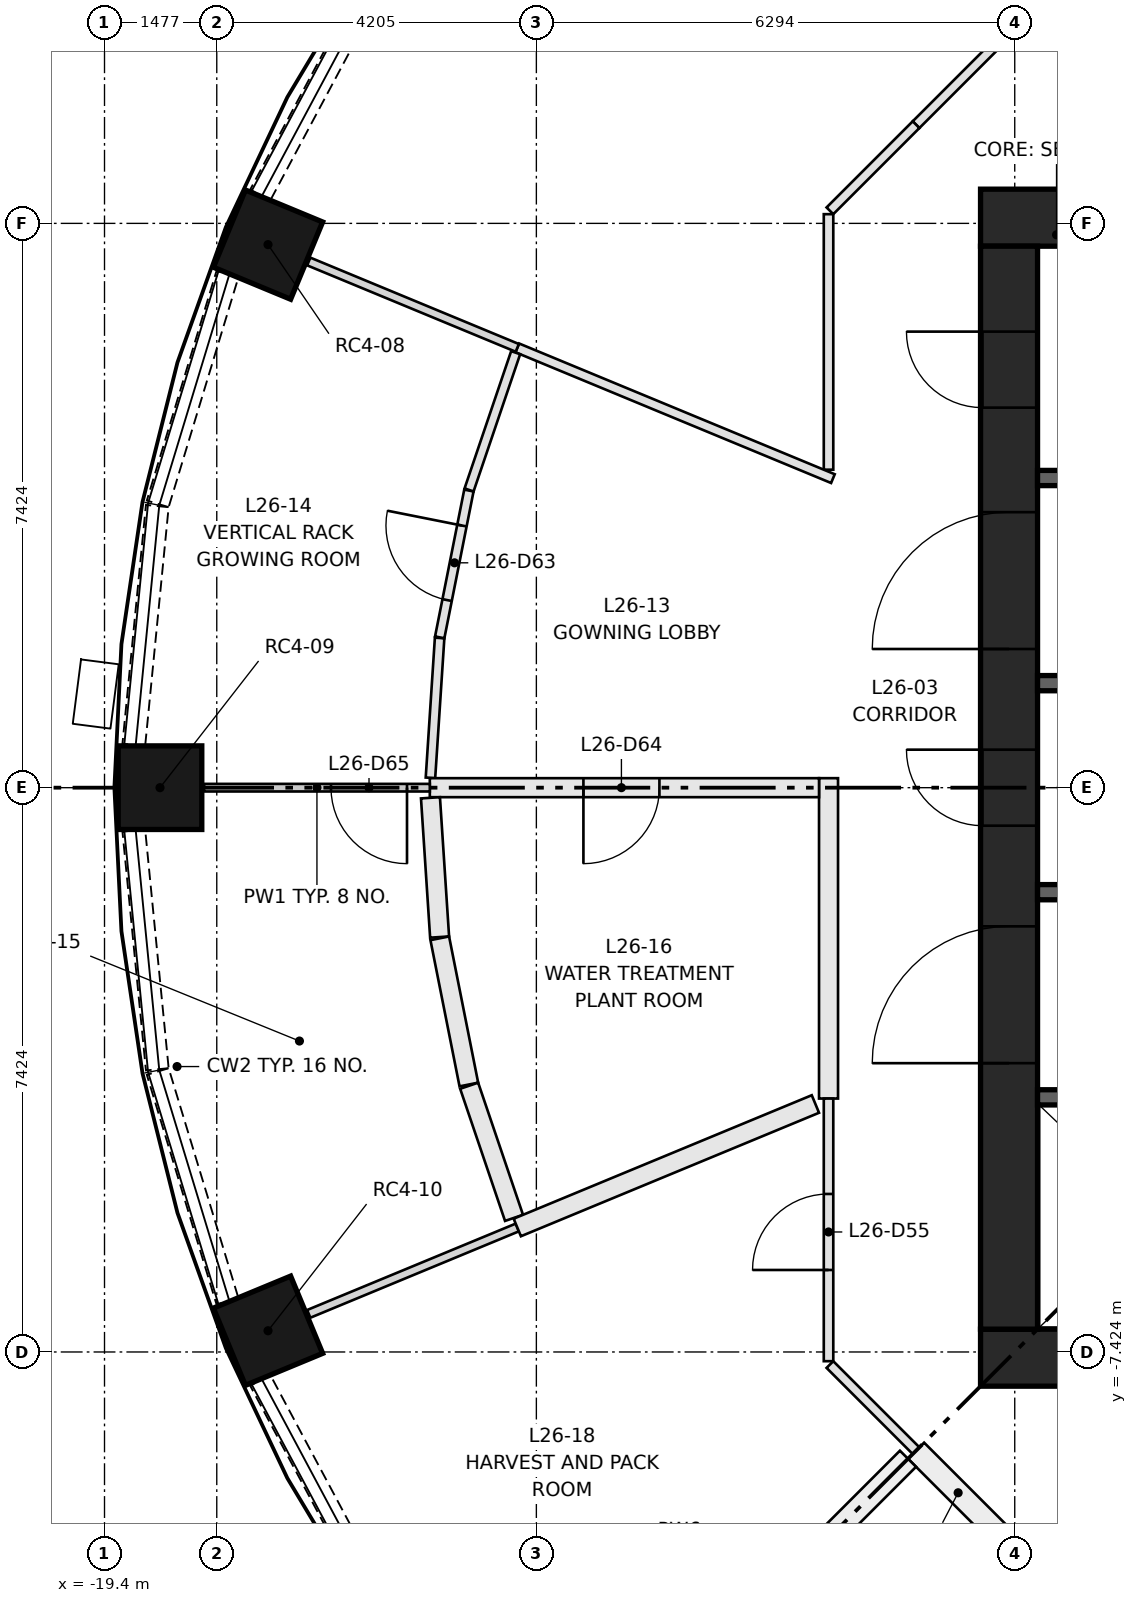
"""IFC4 building model, lengths in metres.
Left out: names, types, materials, properties, quantities, classifications, styles, units other than length and angle.
Written with IfcOpenShell. Run it as: python <this file> out.ifc"""

import sys

from ifc_helpers import new_model, si_unit, direction, frame, frame_2d, origin, origin_2d, place, context, subcontext, project, spatial, rectangle, extrude, element, fill, save


model = new_model("IFC4")
c1 = context("Model", 3, precision=1e-05, world=origin(), true_north=direction((0.0, 1.0)))
c2 = subcontext(c1, "Body", "Model", "MODEL_VIEW")
j1 = project(units=[si_unit("LENGTHUNIT", "METRE"), si_unit("PLANEANGLEUNIT", "RADIAN")], contexts=[c1])
p1 = place(None, origin())
s1 = spatial("IfcSite", under=j1, at=p1, CompositionType="ELEMENT")
p2 = place(p1, origin())
s2 = spatial("IfcBuilding", under=s1, at=p2, CompositionType="ELEMENT")
p3 = place(p2, frame((0.0, 0.0, 101.95)))
s3 = spatial("IfcBuildingStorey", under=s2, at=p3, CompositionType="ELEMENT", Elevation=101.95)
for number, where, z_axis, x_axis in (
    (1, (-17.249, 7.145, 0.0), (0.0, 0.0, 1.0), (-0.924, 0.383, 0.0)),
    (2, (-18.67, 0.0, 0.0), (0.0, 0.0, 1.0), (-1.0, 0.0, 0.0)),
    (3, (-17.249, -7.145, 0.0), (0.0, 0.0, 1.0), (-0.924, -0.383, 0.0)),
):
    element("IfcColumn", number, at=place(p3, frame(where, z_axis=z_axis, x_axis=x_axis)), inside=s3, PredefinedType="COLUMN", context=c2, shape_type="SweptSolid", body=[
        extrude(rectangle(XDim=1.1, YDim=1.1, at=origin_2d()), origin(), (0.0, 0.0, 1.0), 3.65),
    ])
for number, where, z_axis, x_axis in (
    (4, (-7.874, -7.499, 0.0), (0.0, 0.0, 1.0), (1.0, 0.0, 0.0)),
    (5, (-7.874, 7.499, 0.0), (0.0, 0.0, 1.0), (1.0, 0.0, 0.0)),
):
    element("IfcWall", number, at=place(p3, frame(where, z_axis=z_axis, x_axis=x_axis)), inside=s3, PredefinedType="SHEAR", context=c2, shape_type="SweptSolid", body=[
        extrude(rectangle(XDim=15.748, YDim=0.75, at=frame_2d((7.874, 0.0))), origin(), (0.0, 0.0, 1.0), 3.65),
    ])
p4 = place(p3, frame((-7.499, -7.124, 0.0), z_axis=(0.0, 0.0, 1.0), x_axis=(0.0, 1.0, 0.0)))
e6 = element("IfcWall", 6, at=p4, inside=s3, PredefinedType="SHEAR", context=c2, shape_type="SweptSolid", body=[
    extrude(rectangle(XDim=14.248, YDim=0.75, at=frame_2d((7.124, 0.0))), origin(), (0.0, 0.0, 1.0), 3.65),
])
p5 = place(p4, frame((6.624, 0.0, 0.0)))
e7 = element("IfcOpeningElement", 7, at=p5, cuts=e6, PredefinedType="OPENING", context=c2, shape_type="SweptSolid", body=[
    extrude(rectangle(XDim=1.0, YDim=2.1, at=frame_2d((0.5, 1.05))), frame((0.0, 0.385, 0.0), z_axis=(0.0, -1.0, 0.0), x_axis=(1.0, 0.0, 0.0)), (0.0, 0.0, 1.0), 0.77),
])
p6 = place(p4, frame((3.5, 0.0, 0.0)))
e8 = element("IfcOpeningElement", 8, at=p6, cuts=e6, PredefinedType="OPENING", context=c2, shape_type="SweptSolid", body=[
    extrude(rectangle(XDim=1.8, YDim=2.1, at=frame_2d((0.9, 1.05))), frame((0.0, 0.385, 0.0), z_axis=(0.0, -1.0, 0.0), x_axis=(1.0, 0.0, 0.0)), (0.0, 0.0, 1.0), 0.77),
])
p7 = place(p4, frame((8.948, 0.0, 0.0)))
e9 = element("IfcOpeningElement", 9, at=p7, cuts=e6, PredefinedType="OPENING", context=c2, shape_type="SweptSolid", body=[
    extrude(rectangle(XDim=1.8, YDim=2.1, at=frame_2d((0.9, 1.05))), frame((0.0, 0.385, 0.0), z_axis=(0.0, -1.0, 0.0), x_axis=(1.0, 0.0, 0.0)), (0.0, 0.0, 1.0), 0.77),
])
p8 = place(p4, frame((12.124, 0.0, 0.0)))
e10 = element("IfcOpeningElement", 10, at=p8, cuts=e6, PredefinedType="OPENING", context=c2, shape_type="SweptSolid", body=[
    extrude(rectangle(XDim=1.0, YDim=2.1, at=frame_2d((0.5, 1.05))), frame((0.0, 0.385, 0.0), z_axis=(0.0, -1.0, 0.0), x_axis=(1.0, 0.0, 0.0)), (0.0, 0.0, 1.0), 0.77),
])
p9 = place(p3, frame((-7.124, -4.074, 0.0), z_axis=(0.0, 0.0, 1.0), x_axis=(1.0, 0.0, 0.0)))
e11 = element("IfcWall", 11, at=p9, inside=s3, PredefinedType="SHEAR", context=c2, shape_type="SweptSolid", body=[
    extrude(rectangle(XDim=14.248, YDim=0.2, at=frame_2d((7.124, 0.0))), origin(), (0.0, 0.0, 1.0), 3.3),
])
p10 = place(p9, frame((1.069, 0.0, 0.0)))
e12 = element("IfcOpeningElement", 12, at=p10, cuts=e11, PredefinedType="OPENING", context=c2, shape_type="SweptSolid", body=[
    extrude(rectangle(XDim=1.1, YDim=2.1, at=frame_2d((0.55, 1.05))), frame((0.0, 0.11, 0.0), z_axis=(0.0, -1.0, 0.0), x_axis=(1.0, 0.0, 0.0)), (0.0, 0.0, 1.0), 0.22),
])
p11 = place(p9, frame((4.206, 0.0, 0.0)))
e13 = element("IfcOpeningElement", 13, at=p11, cuts=e11, PredefinedType="OPENING", context=c2, shape_type="SweptSolid", body=[
    extrude(rectangle(XDim=1.1, YDim=2.1, at=frame_2d((0.55, 1.05))), frame((0.0, 0.11, 0.0), z_axis=(0.0, -1.0, 0.0), x_axis=(1.0, 0.0, 0.0)), (0.0, 0.0, 1.0), 0.22),
])
p12 = place(p9, frame((6.808, 0.0, 0.0)))
e14 = element("IfcOpeningElement", 14, at=p12, cuts=e11, PredefinedType="OPENING", context=c2, shape_type="SweptSolid", body=[
    extrude(rectangle(XDim=1.0, YDim=2.1, at=frame_2d((0.5, 1.05))), frame((0.0, 0.11, 0.0), z_axis=(0.0, -1.0, 0.0), x_axis=(1.0, 0.0, 0.0)), (0.0, 0.0, 1.0), 0.22),
])
p13 = place(p9, frame((8.777, 0.0, 0.0)))
e15 = element("IfcOpeningElement", 15, at=p13, cuts=e11, PredefinedType="OPENING", context=c2, shape_type="SweptSolid", body=[
    extrude(rectangle(XDim=1.0, YDim=2.1, at=frame_2d((0.5, 1.05))), frame((0.0, 0.11, 0.0), z_axis=(0.0, -1.0, 0.0), x_axis=(1.0, 0.0, 0.0)), (0.0, 0.0, 1.0), 0.22),
])
p14 = place(p9, frame((10.745, 0.0, 0.0)))
e16 = element("IfcOpeningElement", 16, at=p14, cuts=e11, PredefinedType="OPENING", context=c2, shape_type="SweptSolid", body=[
    extrude(rectangle(XDim=1.0, YDim=2.1, at=frame_2d((0.5, 1.05))), frame((0.0, 0.11, 0.0), z_axis=(0.0, -1.0, 0.0), x_axis=(1.0, 0.0, 0.0)), (0.0, 0.0, 1.0), 0.22),
])
p15 = place(p9, frame((12.714, 0.0, 0.0)))
e17 = element("IfcOpeningElement", 17, at=p15, cuts=e11, PredefinedType="OPENING", context=c2, shape_type="SweptSolid", body=[
    extrude(rectangle(XDim=1.0, YDim=2.1, at=frame_2d((0.5, 1.05))), frame((0.0, 0.11, 0.0), z_axis=(0.0, -1.0, 0.0), x_axis=(1.0, 0.0, 0.0)), (0.0, 0.0, 1.0), 0.22),
])
p16 = place(p3, frame((-7.124, 4.074, 0.0), z_axis=(0.0, 0.0, 1.0), x_axis=(1.0, 0.0, 0.0)))
e18 = element("IfcWall", 18, at=p16, inside=s3, PredefinedType="SHEAR", context=c2, shape_type="SweptSolid", body=[
    extrude(rectangle(XDim=7.124, YDim=0.2, at=frame_2d((3.562, 0.0))), origin(), (0.0, 0.0, 1.0), 3.3),
])
for number, where, z_axis, x_axis in (
    (19, (-7.124, -1.375, 0.0), (0.0, 0.0, 1.0), (1.0, 0.0, 0.0)),
    (20, (-7.124, 1.375, 0.0), (0.0, 0.0, 1.0), (1.0, 0.0, 0.0)),
):
    element("IfcWall", number, at=place(p3, frame(where, z_axis=z_axis, x_axis=x_axis)), inside=s3, PredefinedType="SHEAR", context=c2, shape_type="SweptSolid", body=[
        extrude(rectangle(XDim=2.75, YDim=0.2, at=frame_2d((1.375, 0.0))), origin(), (0.0, 0.0, 1.0), 3.3),
    ])
p17 = place(p3, frame((-15.863, 10.582, 0.0), z_axis=(0.0, 0.0, 1.0), x_axis=(-0.471238306932, -0.882005928597, 0.0)))
e21 = element("IfcWall", 21, at=p17, inside=s3, PredefinedType="SOLIDWALL", context=c2, shape_type="SweptSolid", body=[
    extrude(rectangle(XDim=3.157, YDim=0.3, at=frame_2d((1.579, 0.0))), origin(), (0.0, 0.0, 1.0), 0.9),
])
p18 = place(p3, frame((-17.782, 6.756, 0.0), z_axis=(0.0, 0.0, 1.0), x_axis=(-0.290503096001, -0.956874051907, 0.0)))
e22 = element("IfcWall", 22, at=p18, inside=s3, PredefinedType="SOLIDWALL", context=c2, shape_type="SweptSolid", body=[
    extrude(rectangle(XDim=3.157, YDim=0.3, at=frame_2d((1.579, 0.0))), origin(), (0.0, 0.0, 1.0), 0.9),
])
for number, where, z_axis, x_axis in (
    (23, (-18.706, 3.705, 0.0), (0.0, 0.0, 1.0), (-0.098, -0.995, 0.0)),
    (24, (-19.014, -0.564, 0.0), (0.0, 0.0, 1.0), (0.098, -0.995, 0.0)),
):
    element("IfcWall", number, at=place(p3, frame(where, z_axis=z_axis, x_axis=x_axis)), inside=s3, PredefinedType="SOLIDWALL", context=c2, shape_type="SweptSolid", body=[
        extrude(rectangle(XDim=3.156, YDim=0.3, at=frame_2d((1.578, 0.0))), origin(), (0.0, 0.0, 1.0), 0.9),
    ])
p19 = place(p3, frame((-18.7, -3.734, 0.0), z_axis=(0.0, 0.0, 1.0), x_axis=(0.290503096001, -0.956874051907, 0.0)))
e25 = element("IfcWall", 25, at=p19, inside=s3, PredefinedType="SOLIDWALL", context=c2, shape_type="SweptSolid", body=[
    extrude(rectangle(XDim=3.157, YDim=0.3, at=frame_2d((1.579, 0.0))), origin(), (0.0, 0.0, 1.0), 0.9),
])
p20 = place(p3, frame((-17.351, -7.797, 0.0), z_axis=(0.0, 0.0, 1.0), x_axis=(0.471238306932, -0.882005928597, 0.0)))
e26 = element("IfcWall", 26, at=p20, inside=s3, PredefinedType="SOLIDWALL", context=c2, shape_type="SweptSolid", body=[
    extrude(rectangle(XDim=3.157, YDim=0.3, at=frame_2d((1.579, 0.0))), origin(), (0.0, 0.0, 1.0), 0.9),
])
p21 = place(p3, frame((-8.722, 8.722, 0.0), z_axis=(0.0, 0.0, 1.0), x_axis=(0.707030604857, 0.70718294931, 0.0)))
e27 = element("IfcWall", 27, at=p21, inside=s3, PredefinedType="PARTITIONING", context=c2, shape_type="SweptSolid", body=[
    extrude(rectangle(XDim=1.603, YDim=0.125, at=frame_2d((0.801, 0.0))), origin(), (0.0, 0.0, 1.0), 3.3),
])
p22 = place(p3, frame((-9.874, 4.183, 0.0), z_axis=(0.0, 0.0, 1.0), x_axis=(0.0, 1.0, 0.0)))
e28 = element("IfcWall", 28, at=p22, inside=s3, PredefinedType="PARTITIONING", context=c2, shape_type="SweptSolid", body=[
    extrude(rectangle(XDim=3.362, YDim=0.125, at=frame_2d((1.681, 0.0))), origin(), (0.0, 0.0, 1.0), 3.3),
])
p23 = place(p3, frame((-9.856, 7.589, 0.0), z_axis=(0.0, 0.0, 1.0), x_axis=(0.70718294931, 0.707030604857, 0.0)))
e29 = element("IfcWall", 29, at=p23, inside=s3, PredefinedType="PARTITIONING", context=c2, shape_type="SweptSolid", body=[
    extrude(rectangle(XDim=1.603, YDim=0.125, at=frame_2d((0.801, 0.0))), origin(), (0.0, 0.0, 1.0), 3.3),
])
p24 = place(p3, frame((-9.874, -4.09, 0.0), z_axis=(0.0, 0.0, 1.0), x_axis=(0.0, 1.0, 0.0)))
e30 = element("IfcWall", 30, at=p24, inside=s3, PredefinedType="PARTITIONING", context=c2, shape_type="SweptSolid", body=[
    extrude(rectangle(XDim=4.215, YDim=0.25, at=frame_2d((2.107, 0.0))), origin(), (0.0, 0.0, 1.0), 3.3),
])
p25 = place(p3, frame((-9.874, -7.545, 0.0), z_axis=(0.0, 0.0, 1.0), x_axis=(0.0, 1.0, 0.0)))
e31 = element("IfcWall", 31, at=p25, inside=s3, PredefinedType="PARTITIONING", context=c2, shape_type="SweptSolid", body=[
    extrude(rectangle(XDim=3.455, YDim=0.125, at=frame_2d((1.728, 0.0))), origin(), (0.0, 0.0, 1.0), 3.3),
])
p26 = place(p25, frame((1.2, 0.0, 0.0)))
e32 = element("IfcOpeningElement", 32, at=p26, cuts=e31, PredefinedType="OPENING", context=c2, shape_type="SweptSolid", body=[
    extrude(rectangle(XDim=1.0, YDim=2.1, at=frame_2d((0.5, 1.05))), frame((0.0, 0.073, 0.0), z_axis=(0.0, -1.0, 0.0), x_axis=(1.0, 0.0, 0.0)), (0.0, 0.0, 1.0), 0.145),
])
p27 = place(p3, frame((-8.722, -8.722, 0.0), z_axis=(0.0, 0.0, 1.0), x_axis=(-0.70718294931, 0.707030604857, 0.0)))
e33 = element("IfcWall", 33, at=p27, inside=s3, PredefinedType="PARTITIONING", context=c2, shape_type="SweptSolid", body=[
    extrude(rectangle(XDim=1.603, YDim=0.125, at=frame_2d((0.801, 0.0))), origin(), (0.0, 0.0, 1.0), 3.3),
])
p28 = place(p3, frame((-7.615, -9.83, 0.0), z_axis=(0.0, 0.0, 1.0), x_axis=(-0.707028841614, 0.70718471217, 0.0)))
e34 = element("IfcWall", 34, at=p28, inside=s3, PredefinedType="PARTITIONING", context=c2, shape_type="SweptSolid", body=[
    extrude(rectangle(XDim=1.566, YDim=0.3, at=frame_2d((0.783, 0.0))), origin(), (0.0, 0.0, 1.0), 3.3),
])
p29 = place(p3, frame((-9.816, 4.066, 0.0), z_axis=(0.0, 0.0, 1.0), x_axis=(-0.923867212496, 0.382713174158, 0.0)))
e35 = element("IfcWall", 35, at=p29, inside=s3, PredefinedType="PARTITIONING", context=c2, shape_type="SweptSolid", body=[
    extrude(rectangle(XDim=4.495, YDim=0.125, at=frame_2d((2.248, 0.0))), origin(), (0.0, 0.0, 1.0), 3.3),
])
p30 = place(p3, frame((-13.969, 5.786, 0.0), z_axis=(0.0, 0.0, 1.0), x_axis=(-0.923889594764, 0.382659139036, 0.0)))
e36 = element("IfcWall", 36, at=p30, inside=s3, PredefinedType="PARTITIONING", context=c2, shape_type="SweptSolid", body=[
    extrude(rectangle(XDim=2.97, YDim=0.11, at=frame_2d((1.485, 0.0))), origin(), (0.0, 0.0, 1.0), 3.3),
])
p31 = place(p3, frame((-15.112, 0.129, 0.0), z_axis=(0.0, 0.0, 1.0), x_axis=(0.065394347625, 0.997859498777, 0.0)))
e37 = element("IfcWall", 37, at=p31, inside=s3, PredefinedType="PARTITIONING", context=c2, shape_type="SweptSolid", body=[
    extrude(rectangle(XDim=1.844, YDim=0.125, at=frame_2d((0.922, 0.0))), origin(), (0.0, 0.0, 1.0), 3.3),
])
p32 = place(p3, frame((-14.99, 1.978, 0.0), z_axis=(0.0, 0.0, 1.0), x_axis=(0.194995562173, 0.980804124549, 0.0)))
e38 = element("IfcWall", 38, at=p32, inside=s3, PredefinedType="PARTITIONING", context=c2, shape_type="SweptSolid", body=[
    extrude(rectangle(XDim=1.969, YDim=0.125, at=frame_2d((0.985, 0.0))), origin(), (0.0, 0.0, 1.0), 3.3),
])
p33 = place(p32, frame((0.5, 0.0, 0.0)))
e39 = element("IfcOpeningElement", 39, at=p33, cuts=e38, PredefinedType="OPENING", context=c2, shape_type="SweptSolid", body=[
    extrude(rectangle(XDim=1.0, YDim=2.1, at=frame_2d((0.5, 1.05))), frame((0.0, 0.073, 0.0), z_axis=(0.0, -1.0, 0.0), x_axis=(1.0, 0.0, 0.0)), (0.0, 0.0, 1.0), 0.145),
])
p34 = place(p3, frame((-14.604, 3.917, 0.0), z_axis=(0.0, 0.0, 1.0), x_axis=(0.321484961169, 0.946914684511, 0.0)))
e40 = element("IfcWall", 40, at=p34, inside=s3, PredefinedType="PARTITIONING", context=c2, shape_type="SweptSolid", body=[
    extrude(rectangle(XDim=1.907, YDim=0.125, at=frame_2d((0.954, 0.0))), origin(), (0.0, 0.0, 1.0), 3.3),
])
p35 = place(p3, frame((-9.999, 0.0, 0.0), z_axis=(0.0, 0.0, 1.0), x_axis=(-1.0, 0.0, 0.0)))
e41 = element("IfcWall", 41, at=p35, inside=s3, PredefinedType="PARTITIONING", context=c2, shape_type="SweptSolid", body=[
    extrude(rectangle(XDim=5.121, YDim=0.25, at=frame_2d((2.561, 0.0))), origin(), (0.0, 0.0, 1.0), 3.3),
])
p36 = place(p35, frame((2.1, 0.0, 0.0)))
e42 = element("IfcOpeningElement", 42, at=p36, cuts=e41, PredefinedType="OPENING", context=c2, shape_type="SweptSolid", body=[
    extrude(rectangle(XDim=1.0, YDim=2.1, at=frame_2d((0.5, 1.05))), frame((0.0, 0.135, 0.0), z_axis=(0.0, -1.0, 0.0), x_axis=(1.0, 0.0, 0.0)), (0.0, 0.0, 1.0), 0.27),
])
p37 = place(p3, frame((-15.12, 0.0, 0.0), z_axis=(0.0, 0.0, 1.0), x_axis=(-1.0, 0.0, 0.0)))
e43 = element("IfcWall", 43, at=p37, inside=s3, PredefinedType="PARTITIONING", context=c2, shape_type="SweptSolid", body=[
    extrude(rectangle(XDim=2.97, YDim=0.1, at=frame_2d((1.485, 0.0))), origin(), (0.0, 0.0, 1.0), 3.3),
])
p38 = place(p37, frame((0.3, 0.0, 0.0)))
e44 = element("IfcOpeningElement", 44, at=p38, cuts=e43, PredefinedType="OPENING", context=c2, shape_type="SweptSolid", body=[
    extrude(rectangle(XDim=1.0, YDim=2.1, at=frame_2d((0.5, 1.05))), frame((0.0, 0.06, 0.0), z_axis=(0.0, -1.0, 0.0), x_axis=(1.0, 0.0, 0.0)), (0.0, 0.0, 1.0), 0.12),
])
p39 = place(p3, frame((-15.111, -0.133, 0.0), z_axis=(0.0, 0.0, 1.0), x_axis=(0.065424560105, -0.997857518354, 0.0)))
e45 = element("IfcWall", 45, at=p39, inside=s3, PredefinedType="PARTITIONING", context=c2, shape_type="SweptSolid", body=[
    extrude(rectangle(XDim=1.836, YDim=0.25, at=frame_2d((0.918, 0.0))), origin(), (0.0, 0.0, 1.0), 3.3),
])
p40 = place(p3, frame((-14.989, -1.982, 0.0), z_axis=(0.0, 0.0, 1.0), x_axis=(0.195062715887, -0.9807907712, 0.0)))
e46 = element("IfcWall", 46, at=p40, inside=s3, PredefinedType="PARTITIONING", context=c2, shape_type="SweptSolid", body=[
    extrude(rectangle(XDim=1.961, YDim=0.25, at=frame_2d((0.98, 0.0))), origin(), (0.0, 0.0, 1.0), 3.3),
])
p41 = place(p3, frame((-14.602, -3.921, 0.0), z_axis=(0.0, 0.0, 1.0), x_axis=(0.321528438759, -0.946899922415, 0.0)))
e47 = element("IfcWall", 47, at=p41, inside=s3, PredefinedType="PARTITIONING", context=c2, shape_type="SweptSolid", body=[
    extrude(rectangle(XDim=1.836, YDim=0.25, at=frame_2d((0.918, 0.0))), origin(), (0.0, 0.0, 1.0), 3.3),
])
p42 = place(p3, frame((-13.969, -5.786, 0.0), z_axis=(0.0, 0.0, 1.0), x_axis=(-0.923889594764, -0.382659139036, 0.0)))
e48 = element("IfcWall", 48, at=p42, inside=s3, PredefinedType="PARTITIONING", context=c2, shape_type="SweptSolid", body=[
    extrude(rectangle(XDim=2.97, YDim=0.11, at=frame_2d((1.485, 0.0))), origin(), (0.0, 0.0, 1.0), 3.3),
])
p43 = place(p3, frame((-10.047, -4.162, 0.0), z_axis=(0.0, 0.0, 1.0), x_axis=(-0.923886463326, -0.382666699469, 0.0)))
e49 = element("IfcWall", 49, at=p43, inside=s3, PredefinedType="PARTITIONING", context=c2, shape_type="SweptSolid", body=[
    extrude(rectangle(XDim=4.245, YDim=0.25, at=frame_2d((2.123, 0.0))), origin(), (0.0, 0.0, 1.0), 3.3),
])
p44 = place(p3, frame((-12.792, -12.792, 0.0), z_axis=(0.0, 0.0, 1.0), x_axis=(0.707106781187, 0.707106781187, 0.0)))
e50 = element("IfcWall", 50, at=p44, inside=s3, PredefinedType="PARTITIONING", context=c2, shape_type="SweptSolid", body=[
    extrude(rectangle(XDim=5.604, YDim=0.3, at=frame_2d((2.802, 0.0))), origin(), (0.0, 0.0, 1.0), 3.3),
])
p45 = place(p5, origin())
e51 = element("IfcDoor", 51, at=p45, inside=s3, OperationType="SINGLE_SWING_RIGHT", PredefinedType="DOOR", context=c2, shape_type="SweptSolid", body=[
    extrude(rectangle(XDim=1.0, YDim=2.1, at=frame_2d((0.5, 1.05))), frame((0.0, 0.375, 0.0), z_axis=(0.0, -1.0, 0.0), x_axis=(1.0, 0.0, 0.0)), (0.0, 0.0, 1.0), 0.05),
])
fill(e7, e51)
p46 = place(p6, origin())
e52 = element("IfcDoor", 52, at=p46, inside=s3, OperationType="DOUBLE_DOOR_SINGLE_SWING", PredefinedType="DOOR", context=c2, shape_type="SweptSolid", body=[
    extrude(rectangle(XDim=1.8, YDim=2.1, at=frame_2d((0.9, 1.05))), frame((0.0, 0.025, 0.0), z_axis=(0.0, -1.0, 0.0), x_axis=(1.0, 0.0, 0.0)), (0.0, 0.0, 1.0), 0.05),
])
fill(e8, e52)
p47 = place(p7, origin())
e53 = element("IfcDoor", 53, at=p47, inside=s3, OperationType="DOUBLE_DOOR_SINGLE_SWING", PredefinedType="DOOR", context=c2, shape_type="SweptSolid", body=[
    extrude(rectangle(XDim=1.8, YDim=2.1, at=frame_2d((0.9, 1.05))), frame((0.0, 0.025, 0.0), z_axis=(0.0, -1.0, 0.0), x_axis=(1.0, 0.0, 0.0)), (0.0, 0.0, 1.0), 0.05),
])
fill(e9, e53)
p48 = place(p8, origin())
e54 = element("IfcDoor", 54, at=p48, inside=s3, OperationType="SINGLE_SWING_RIGHT", PredefinedType="DOOR", context=c2, shape_type="SweptSolid", body=[
    extrude(rectangle(XDim=1.0, YDim=2.1, at=frame_2d((0.5, 1.05))), frame((0.0, 0.375, 0.0), z_axis=(0.0, -1.0, 0.0), x_axis=(1.0, 0.0, 0.0)), (0.0, 0.0, 1.0), 0.05),
])
fill(e10, e54)
p49 = place(p26, origin())
e55 = element("IfcDoor", 55, at=p49, inside=s3, OperationType="SINGLE_SWING_LEFT", PredefinedType="DOOR", context=c2, shape_type="SweptSolid", body=[
    extrude(rectangle(XDim=1.0, YDim=2.1, at=frame_2d((0.5, 1.05))), frame((0.0, 0.025, 0.0), z_axis=(0.0, -1.0, 0.0), x_axis=(1.0, 0.0, 0.0)), (0.0, 0.0, 1.0), 0.05),
])
fill(e32, e55)
p50 = place(p33, origin())
e56 = element("IfcDoor", 56, at=p50, inside=s3, OperationType="SINGLE_SWING_RIGHT", PredefinedType="DOOR", context=c2, shape_type="SweptSolid", body=[
    extrude(rectangle(XDim=1.0, YDim=2.1, at=frame_2d((0.5, 1.05))), frame((0.0, 0.025, 0.0), z_axis=(0.0, -1.0, 0.0), x_axis=(1.0, 0.0, 0.0)), (0.0, 0.0, 1.0), 0.05),
])
fill(e39, e56)
p51 = place(p36, origin())
e57 = element("IfcDoor", 57, at=p51, inside=s3, OperationType="SINGLE_SWING_RIGHT", PredefinedType="DOOR", context=c2, shape_type="SweptSolid", body=[
    extrude(rectangle(XDim=1.0, YDim=2.1, at=frame_2d((0.5, 1.05))), frame((0.0, 0.025, 0.0), z_axis=(0.0, -1.0, 0.0), x_axis=(1.0, 0.0, 0.0)), (0.0, 0.0, 1.0), 0.05),
])
fill(e42, e57)
p52 = place(p38, origin())
e58 = element("IfcDoor", 58, at=p52, inside=s3, OperationType="SINGLE_SWING_LEFT", PredefinedType="DOOR", context=c2, shape_type="SweptSolid", body=[
    extrude(rectangle(XDim=1.0, YDim=2.1, at=frame_2d((0.5, 1.05))), frame((0.0, 0.025, 0.0), z_axis=(0.0, -1.0, 0.0), x_axis=(1.0, 0.0, 0.0)), (0.0, 0.0, 1.0), 0.05),
])
fill(e44, e58)
save(model, sys.argv[1])
